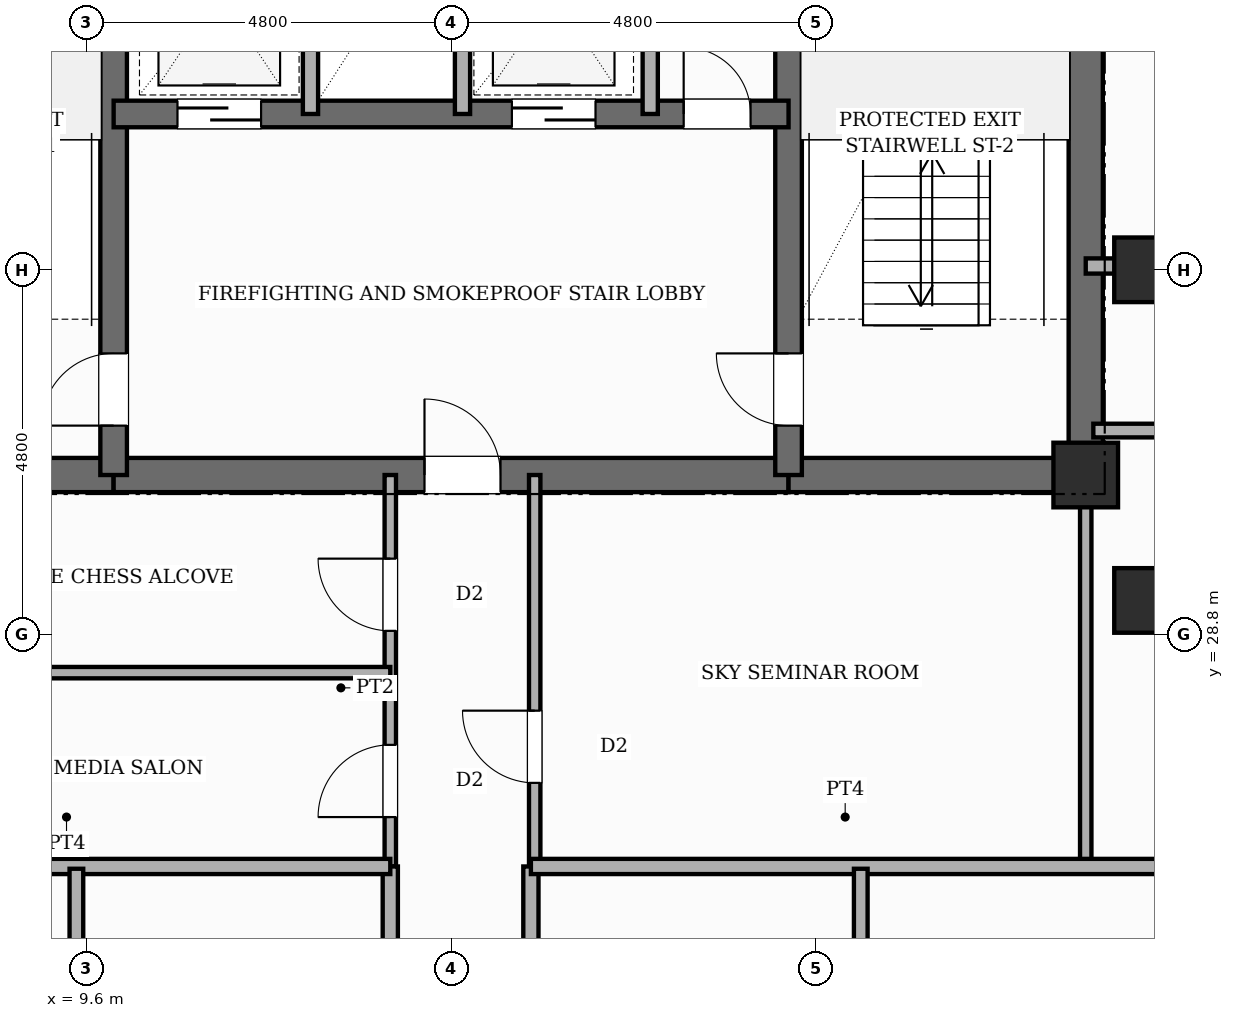
"""IFC4 building model, lengths in metres.
Left out: names, types, materials, properties, quantities, classifications, styles, units other than length and angle.
Written with IfcOpenShell. Run it as: python <this file> out.ifc"""

import sys

from ifc_helpers import new_model, si_unit, direction, frame, frame_2d, origin, origin_2d, place, context, subcontext, project, spatial, rectangle, extrude, element, fill, save


model = new_model("IFC4")
c1 = context("Model", 3, precision=1e-05, world=origin(), true_north=direction((0.0, 1.0)))
c2 = subcontext(c1, "Body", "Model", "MODEL_VIEW")
j1 = project(units=[si_unit("LENGTHUNIT", "METRE"), si_unit("PLANEANGLEUNIT", "RADIAN")], contexts=[c1])
p1 = place(None, origin())
s1 = spatial("IfcSite", under=j1, at=p1, CompositionType="ELEMENT")
p2 = place(p1, origin())
s2 = spatial("IfcBuilding", under=s1, at=p2, CompositionType="ELEMENT")
p3 = place(p2, frame((0.0, 0.0, 211.0)))
s3 = spatial("IfcBuildingStorey", under=s2, at=p3, CompositionType="ELEMENT", Elevation=211.0)
p4 = place(p3, frame((22.75, 30.675, 0.0), z_axis=(0.0, 0.0, 1.0), x_axis=(0.0, 1.0, 0.0)))
e1 = element("IfcWall", 1, at=p4, inside=s3, PredefinedType="SHEAR", context=c2, shape_type="SweptSolid", body=[
    extrude(rectangle(XDim=15.35, YDim=0.45, at=frame_2d((7.675, 0.0))), origin(), (0.0, 0.0, 1.0), 3.6),
])
p5 = place(p4, frame((10.675, 0.0, 0.0)))
e2 = element("IfcOpeningElement", 2, at=p5, cuts=e1, PredefinedType="OPENING", context=c2, shape_type="SweptSolid", body=[
    extrude(rectangle(XDim=1.0, YDim=2.15, at=frame_2d((0.5, 1.075))), frame((0.0, 0.235, 0.0), z_axis=(0.0, -1.0, 0.0), x_axis=(1.0, 0.0, 0.0)), (0.0, 0.0, 1.0), 0.47),
])
p6 = place(p3, frame((6.05, 30.9, 0.0), z_axis=(0.0, 0.0, 1.0), x_axis=(1.0, 0.0, 0.0)))
e3 = element("IfcWall", 3, at=p6, inside=s3, PredefinedType="SHEAR", context=c2, shape_type="SweptSolid", body=[
    extrude(rectangle(XDim=3.91, YDim=0.45, at=frame_2d((1.955, 0.0))), origin(), (0.0, 0.0, 1.0), 3.6),
])
p7 = place(p3, frame((9.96, 30.9, 0.0), z_axis=(0.0, 0.0, 1.0), x_axis=(1.0, 0.0, 0.0)))
e4 = element("IfcWall", 4, at=p7, inside=s3, PredefinedType="SHEAR", context=c2, shape_type="SweptSolid", body=[
    extrude(rectangle(XDim=8.88, YDim=0.45, at=frame_2d((4.44, 0.0))), origin(), (0.0, 0.0, 1.0), 3.6),
])
p8 = place(p7, frame((4.09, 0.0, 0.0)))
e5 = element("IfcOpeningElement", 5, at=p8, cuts=e4, PredefinedType="OPENING", context=c2, shape_type="SweptSolid", body=[
    extrude(rectangle(XDim=1.0, YDim=2.15, at=frame_2d((0.5, 1.075))), frame((0.0, 0.235, 0.0), z_axis=(0.0, -1.0, 0.0), x_axis=(1.0, 0.0, 0.0)), (0.0, 0.0, 1.0), 0.47),
])
p9 = place(p3, frame((18.84, 30.9, 0.0), z_axis=(0.0, 0.0, 1.0), x_axis=(1.0, 0.0, 0.0)))
e6 = element("IfcWall", 6, at=p9, inside=s3, PredefinedType="SHEAR", context=c2, shape_type="SweptSolid", body=[
    extrude(rectangle(XDim=3.91, YDim=0.45, at=frame_2d((1.955, 0.0))), origin(), (0.0, 0.0, 1.0), 3.6),
])
p10 = place(p3, frame((9.96, 30.9, 0.0), z_axis=(0.0, 0.0, 1.0), x_axis=(0.0, 1.0, 0.0)))
e7 = element("IfcWall", 7, at=p10, inside=s3, PredefinedType="SHEAR", context=c2, shape_type="SweptSolid", body=[
    extrude(rectangle(XDim=14.9, YDim=0.35, at=frame_2d((7.45, 0.0))), origin(), (0.0, 0.0, 1.0), 3.6),
])
p11 = place(p10, frame((0.65, 0.0, 0.0)))
e8 = element("IfcOpeningElement", 8, at=p11, cuts=e7, PredefinedType="OPENING", context=c2, shape_type="SweptSolid", body=[
    extrude(rectangle(XDim=0.95, YDim=2.1, at=frame_2d((0.475, 1.05))), frame((0.0, 0.185, 0.0), z_axis=(0.0, -1.0, 0.0), x_axis=(1.0, 0.0, 0.0)), (0.0, 0.0, 1.0), 0.37),
])
p12 = place(p10, frame((10.45, 0.0, 0.0)))
e9 = element("IfcOpeningElement", 9, at=p12, cuts=e7, PredefinedType="OPENING", context=c2, shape_type="SweptSolid", body=[
    extrude(rectangle(XDim=1.0, YDim=2.15, at=frame_2d((0.5, 1.075))), frame((0.0, 0.185, 0.0), z_axis=(0.0, -1.0, 0.0), x_axis=(1.0, 0.0, 0.0)), (0.0, 0.0, 1.0), 0.37),
])
p13 = place(p3, frame((18.84, 30.9, 0.0), z_axis=(0.0, 0.0, 1.0), x_axis=(0.0, 1.0, 0.0)))
e10 = element("IfcWall", 10, at=p13, inside=s3, PredefinedType="SHEAR", context=c2, shape_type="SweptSolid", body=[
    extrude(rectangle(XDim=14.9, YDim=0.35, at=frame_2d((7.45, 0.0))), origin(), (0.0, 0.0, 1.0), 3.6),
])
p14 = place(p13, frame((0.65, 0.0, 0.0)))
e11 = element("IfcOpeningElement", 11, at=p14, cuts=e10, PredefinedType="OPENING", context=c2, shape_type="SweptSolid", body=[
    extrude(rectangle(XDim=0.95, YDim=2.1, at=frame_2d((0.475, 1.05))), frame((0.0, 0.185, 0.0), z_axis=(0.0, -1.0, 0.0), x_axis=(1.0, 0.0, 0.0)), (0.0, 0.0, 1.0), 0.37),
])
p15 = place(p13, frame((10.45, 0.0, 0.0)))
e12 = element("IfcOpeningElement", 12, at=p15, cuts=e10, PredefinedType="OPENING", context=c2, shape_type="SweptSolid", body=[
    extrude(rectangle(XDim=1.0, YDim=2.15, at=frame_2d((0.5, 1.075))), frame((0.0, 0.185, 0.0), z_axis=(0.0, -1.0, 0.0), x_axis=(1.0, 0.0, 0.0)), (0.0, 0.0, 1.0), 0.37),
])
p16 = place(p3, frame((9.96, 35.65, 0.0), z_axis=(0.0, 0.0, 1.0), x_axis=(1.0, 0.0, 0.0)))
e13 = element("IfcWall", 13, at=p16, inside=s3, PredefinedType="SHEAR", context=c2, shape_type="SweptSolid", body=[
    extrude(rectangle(XDim=8.88, YDim=0.35, at=frame_2d((4.44, 0.0))), origin(), (0.0, 0.0, 1.0), 3.6),
])
p17 = place(p16, frame((0.84, 0.0, 0.0)))
e14 = element("IfcOpeningElement", 14, at=p17, cuts=e13, PredefinedType="OPENING", context=c2, shape_type="SweptSolid", body=[
    extrude(rectangle(XDim=1.1, YDim=2.15, at=frame_2d((0.55, 1.075))), frame((0.0, 0.185, 0.0), z_axis=(0.0, -1.0, 0.0), x_axis=(1.0, 0.0, 0.0)), (0.0, 0.0, 1.0), 0.37),
])
p18 = place(p16, frame((5.24, 0.0, 0.0)))
e15 = element("IfcOpeningElement", 15, at=p18, cuts=e13, PredefinedType="OPENING", context=c2, shape_type="SweptSolid", body=[
    extrude(rectangle(XDim=1.1, YDim=2.15, at=frame_2d((0.55, 1.075))), frame((0.0, 0.185, 0.0), z_axis=(0.0, -1.0, 0.0), x_axis=(1.0, 0.0, 0.0)), (0.0, 0.0, 1.0), 0.37),
])
p19 = place(p16, frame((7.5, 0.0, 0.0)))
e16 = element("IfcOpeningElement", 16, at=p19, cuts=e13, PredefinedType="OPENING", context=c2, shape_type="SweptSolid", body=[
    extrude(rectangle(XDim=0.88, YDim=2.1, at=frame_2d((0.44, 1.05))), frame((0.0, 0.185, 0.0), z_axis=(0.0, -1.0, 0.0), x_axis=(1.0, 0.0, 0.0)), (0.0, 0.0, 1.0), 0.37),
])
for number, where, z_axis, x_axis in (
    (17, (22.75, 30.9, 0.0), (0.0, 0.0, 1.0), (1.0, 0.0, 0.0)),
    (18, (23.55, 29.25, 0.0), (0.0, 0.0, 1.0), (1.0, 0.0, 0.0)),
    (19, (23.55, 33.6, 0.0), (0.0, 0.0, 1.0), (1.0, 0.0, 0.0)),
):
    element("IfcColumn", number, at=place(p3, frame(where, z_axis=z_axis, x_axis=x_axis)), inside=s3, PredefinedType="COLUMN", context=c2, shape_type="SweptSolid", body=[
        extrude(rectangle(XDim=0.85, YDim=0.85, at=origin_2d()), origin(), (0.0, 0.0, 1.0), 3.6),
    ])
for number, where, z_axis, x_axis in (
    (20, (12.55, 35.65, 0.0), (0.0, 0.0, 1.0), (0.0, 1.0, 0.0)),
    (21, (14.55, 35.65, 0.0), (0.0, 0.0, 1.0), (0.0, 1.0, 0.0)),
):
    element("IfcWall", number, at=place(p3, frame(where, z_axis=z_axis, x_axis=x_axis)), inside=s3, PredefinedType="POLYGONAL", context=c2, shape_type="SweptSolid", body=[
        extrude(rectangle(XDim=3.07, YDim=0.2, at=frame_2d((1.535, 0.0))), origin(), (0.0, 0.0, 1.0), 3.38),
    ])
p20 = place(p3, frame((17.02, 35.65, 0.0), z_axis=(0.0, 0.0, 1.0), x_axis=(0.0, 1.0, 0.0)))
e22 = element("IfcWall", 22, at=p20, inside=s3, PredefinedType="POLYGONAL", context=c2, shape_type="SweptSolid", body=[
    extrude(rectangle(XDim=5.15, YDim=0.2, at=frame_2d((2.575, 0.0))), origin(), (0.0, 0.0, 1.0), 3.38),
])
p21 = place(p3, frame((13.6, 25.75, 0.0), z_axis=(0.0, 0.0, 1.0), x_axis=(0.0, 1.0, 0.0)))
e23 = element("IfcWall", 23, at=p21, inside=s3, PredefinedType="PARTITIONING", context=c2, shape_type="SweptSolid", body=[
    extrude(rectangle(XDim=5.15, YDim=0.15, at=frame_2d((2.575, 0.0))), origin(), (0.0, 0.0, 1.0), 3.38),
])
p22 = place(p21, frame((0.65, 0.0, 0.0)))
e24 = element("IfcOpeningElement", 24, at=p22, cuts=e23, PredefinedType="OPENING", context=c2, shape_type="SweptSolid", body=[
    extrude(rectangle(XDim=0.95, YDim=2.15, at=frame_2d((0.475, 1.075))), frame((0.0, 0.085, 0.0), z_axis=(0.0, -1.0, 0.0), x_axis=(1.0, 0.0, 0.0)), (0.0, 0.0, 1.0), 0.17),
])
p23 = place(p21, frame((3.1, 0.0, 0.0)))
e25 = element("IfcOpeningElement", 25, at=p23, cuts=e23, PredefinedType="OPENING", context=c2, shape_type="SweptSolid", body=[
    extrude(rectangle(XDim=0.95, YDim=2.15, at=frame_2d((0.475, 1.075))), frame((0.0, 0.085, 0.0), z_axis=(0.0, -1.0, 0.0), x_axis=(1.0, 0.0, 0.0)), (0.0, 0.0, 1.0), 0.17),
])
p24 = place(p3, frame((15.5, 25.75, 0.0), z_axis=(0.0, 0.0, 1.0), x_axis=(0.0, 1.0, 0.0)))
e26 = element("IfcWall", 26, at=p24, inside=s3, PredefinedType="PARTITIONING", context=c2, shape_type="SweptSolid", body=[
    extrude(rectangle(XDim=5.15, YDim=0.15, at=frame_2d((2.575, 0.0))), origin(), (0.0, 0.0, 1.0), 3.38),
])
p25 = place(p24, frame((1.1, 0.0, 0.0)))
e27 = element("IfcOpeningElement", 27, at=p25, cuts=e26, PredefinedType="OPENING", context=c2, shape_type="SweptSolid", body=[
    extrude(rectangle(XDim=0.95, YDim=2.15, at=frame_2d((0.475, 1.075))), frame((0.0, 0.085, 0.0), z_axis=(0.0, -1.0, 0.0), x_axis=(1.0, 0.0, 0.0)), (0.0, 0.0, 1.0), 0.17),
])
p26 = place(p3, frame((22.75, 25.75, 0.0), z_axis=(0.0, 0.0, 1.0), x_axis=(0.0, 1.0, 0.0)))
e28 = element("IfcWall", 28, at=p26, inside=s3, PredefinedType="PARTITIONING", context=c2, shape_type="SweptSolid", body=[
    extrude(rectangle(XDim=5.15, YDim=0.15, at=frame_2d((2.575, 0.0))), origin(), (0.0, 0.0, 1.0), 3.38),
])
p27 = place(p3, frame((6.05, 28.3, 0.0), z_axis=(0.0, 0.0, 1.0), x_axis=(1.0, 0.0, 0.0)))
e29 = element("IfcWall", 29, at=p27, inside=s3, PredefinedType="PARTITIONING", context=c2, shape_type="SweptSolid", body=[
    extrude(rectangle(XDim=7.55, YDim=0.15, at=frame_2d((3.775, 0.0))), origin(), (0.0, 0.0, 1.0), 3.38),
])
p28 = place(p3, frame((13.6, 9.88, 0.0), z_axis=(0.0, 0.0, 1.0), x_axis=(0.0, 1.0, 0.0)))
e30 = element("IfcWall", 30, at=p28, inside=s3, PredefinedType="PARTITIONING", context=c2, shape_type="SweptSolid", body=[
    extrude(rectangle(XDim=15.87, YDim=0.2, at=frame_2d((7.935, 0.0))), origin(), (0.0, 0.0, 1.0), 3.38),
])
p29 = place(p28, frame((0.949, 0.0, 0.0)))
e31 = element("IfcOpeningElement", 31, at=p29, cuts=e30, PredefinedType="OPENING", context=c2, shape_type="SweptSolid", body=[
    extrude(rectangle(XDim=0.98, YDim=2.18, at=frame_2d((0.49, 1.09))), frame((0.0, 0.11, 0.0), z_axis=(0.0, -1.0, 0.0), x_axis=(1.0, 0.0, 0.0)), (0.0, 0.0, 1.0), 0.22),
])
p30 = place(p28, frame((6.12, 0.0, 0.0)))
e32 = element("IfcOpeningElement", 32, at=p30, cuts=e30, PredefinedType="OPENING", context=c2, shape_type="SweptSolid", body=[
    extrude(rectangle(XDim=0.98, YDim=2.18, at=frame_2d((0.49, 1.09))), frame((0.0, 0.11, 0.0), z_axis=(0.0, -1.0, 0.0), x_axis=(1.0, 0.0, 0.0)), (0.0, 0.0, 1.0), 0.22),
])
p31 = place(p28, frame((11.52, 0.0, 0.0)))
e33 = element("IfcOpeningElement", 33, at=p31, cuts=e30, PredefinedType="OPENING", context=c2, shape_type="SweptSolid", body=[
    extrude(rectangle(XDim=0.98, YDim=2.18, at=frame_2d((0.49, 1.09))), frame((0.0, 0.11, 0.0), z_axis=(0.0, -1.0, 0.0), x_axis=(1.0, 0.0, 0.0)), (0.0, 0.0, 1.0), 0.22),
])
p32 = place(p3, frame((15.45, 9.88, 0.0), z_axis=(0.0, 0.0, 1.0), x_axis=(0.0, 1.0, 0.0)))
e34 = element("IfcWall", 34, at=p32, inside=s3, PredefinedType="PARTITIONING", context=c2, shape_type="SweptSolid", body=[
    extrude(rectangle(XDim=15.87, YDim=0.2, at=frame_2d((7.935, 0.0))), origin(), (0.0, 0.0, 1.0), 3.38),
])
p33 = place(p32, frame((0.949, 0.0, 0.0)))
e35 = element("IfcOpeningElement", 35, at=p33, cuts=e34, PredefinedType="OPENING", context=c2, shape_type="SweptSolid", body=[
    extrude(rectangle(XDim=0.98, YDim=2.18, at=frame_2d((0.49, 1.09))), frame((0.0, 0.11, 0.0), z_axis=(0.0, -1.0, 0.0), x_axis=(1.0, 0.0, 0.0)), (0.0, 0.0, 1.0), 0.22),
])
p34 = place(p32, frame((6.12, 0.0, 0.0)))
e36 = element("IfcOpeningElement", 36, at=p34, cuts=e34, PredefinedType="OPENING", context=c2, shape_type="SweptSolid", body=[
    extrude(rectangle(XDim=0.98, YDim=2.18, at=frame_2d((0.49, 1.09))), frame((0.0, 0.11, 0.0), z_axis=(0.0, -1.0, 0.0), x_axis=(1.0, 0.0, 0.0)), (0.0, 0.0, 1.0), 0.22),
])
p35 = place(p32, frame((11.52, 0.0, 0.0)))
e37 = element("IfcOpeningElement", 37, at=p35, cuts=e34, PredefinedType="OPENING", context=c2, shape_type="SweptSolid", body=[
    extrude(rectangle(XDim=0.98, YDim=2.18, at=frame_2d((0.49, 1.09))), frame((0.0, 0.11, 0.0), z_axis=(0.0, -1.0, 0.0), x_axis=(1.0, 0.0, 0.0)), (0.0, 0.0, 1.0), 0.22),
])
p36 = place(p3, frame((5.08, 25.75, 0.0), z_axis=(0.0, 0.0, 1.0), x_axis=(1.0, 0.0, 0.0)))
e38 = element("IfcWall", 38, at=p36, inside=s3, PredefinedType="PARTITIONING", context=c2, shape_type="SweptSolid", body=[
    extrude(rectangle(XDim=8.52, YDim=0.2, at=frame_2d((4.26, 0.0))), origin(), (0.0, 0.0, 1.0), 3.38),
])
p37 = place(p3, frame((15.45, 25.75, 0.0), z_axis=(0.0, 0.0, 1.0), x_axis=(1.0, 0.0, 0.0)))
e39 = element("IfcWall", 39, at=p37, inside=s3, PredefinedType="PARTITIONING", context=c2, shape_type="SweptSolid", body=[
    extrude(rectangle(XDim=8.27, YDim=0.2, at=frame_2d((4.135, 0.0))), origin(), (0.0, 0.0, 1.0), 3.38),
])
for number, where, z_axis, x_axis in (
    (40, (9.47, 22.94, 0.0), (0.0, 0.0, 1.0), (0.0, 1.0, 0.0)),
    (41, (19.79, 22.94, 0.0), (0.0, 0.0, 1.0), (0.0, 1.0, 0.0)),
):
    element("IfcWall", number, at=place(p3, frame(where, z_axis=z_axis, x_axis=x_axis)), inside=s3, PredefinedType="PLUMBINGWALL", context=c2, shape_type="SweptSolid", body=[
        extrude(rectangle(XDim=2.78, YDim=0.18, at=frame_2d((1.39, 0.0))), origin(), (0.0, 0.0, 1.0), 3.38),
    ])
p38 = place(p3, frame((22.75, 33.65, 0.0), z_axis=(0.0, 0.0, 1.0), x_axis=(1.0, 0.0, 0.0)))
e42 = element("IfcWall", 42, at=p38, inside=s3, PredefinedType="PARTITIONING", context=c2, shape_type="SweptSolid", body=[
    extrude(rectangle(XDim=29.77, YDim=0.2, at=frame_2d((14.885, 0.0))), origin(), (0.0, 0.0, 1.0), 3.38),
])
p39 = place(p38, frame((5.995, 0.0, 0.0)))
e43 = element("IfcOpeningElement", 43, at=p39, cuts=e42, PredefinedType="OPENING", context=c2, shape_type="SweptSolid", body=[
    extrude(rectangle(XDim=0.98, YDim=2.18, at=frame_2d((0.49, 1.09))), frame((0.0, 0.11, 0.0), z_axis=(0.0, -1.0, 0.0), x_axis=(1.0, 0.0, 0.0)), (0.0, 0.0, 1.0), 0.22),
])
p40 = place(p38, frame((10.896, 0.0, 0.0)))
e44 = element("IfcOpeningElement", 44, at=p40, cuts=e42, PredefinedType="OPENING", context=c2, shape_type="SweptSolid", body=[
    extrude(rectangle(XDim=0.98, YDim=2.18, at=frame_2d((0.49, 1.09))), frame((0.0, 0.11, 0.0), z_axis=(0.0, -1.0, 0.0), x_axis=(1.0, 0.0, 0.0)), (0.0, 0.0, 1.0), 0.22),
])
p41 = place(p38, frame((20.73, 0.0, 0.0)))
e45 = element("IfcOpeningElement", 45, at=p41, cuts=e42, PredefinedType="OPENING", context=c2, shape_type="SweptSolid", body=[
    extrude(rectangle(XDim=0.98, YDim=2.18, at=frame_2d((0.49, 1.09))), frame((0.0, 0.11, 0.0), z_axis=(0.0, -1.0, 0.0), x_axis=(1.0, 0.0, 0.0)), (0.0, 0.0, 1.0), 0.22),
])
p42 = place(p3, frame((22.85, 31.485, 0.0), z_axis=(0.0, 0.0, 1.0), x_axis=(1.0, 0.0, 0.0)))
e46 = element("IfcWall", 46, at=p42, inside=s3, PredefinedType="PLUMBINGWALL", context=c2, shape_type="SweptSolid", body=[
    extrude(rectangle(XDim=3.9, YDim=0.18, at=frame_2d((1.95, 0.0))), origin(), (0.0, 0.0, 1.0), 3.38),
])
p43 = place(p11, origin())
e47 = element("IfcDoor", 47, at=p43, inside=s3, OperationType="SINGLE_SWING_LEFT", PredefinedType="DOOR", context=c2, shape_type="SweptSolid", body=[
    extrude(rectangle(XDim=0.95, YDim=2.1, at=frame_2d((0.475, 1.05))), frame((0.0, 0.025, 0.0), z_axis=(0.0, -1.0, 0.0), x_axis=(1.0, 0.0, 0.0)), (0.0, 0.0, 1.0), 0.05),
])
fill(e8, e47)
p44 = place(p14, origin())
e48 = element("IfcDoor", 48, at=p44, inside=s3, OperationType="SINGLE_SWING_RIGHT", PredefinedType="DOOR", context=c2, shape_type="SweptSolid", body=[
    extrude(rectangle(XDim=0.95, YDim=2.1, at=frame_2d((0.475, 1.05))), frame((0.0, 0.025, 0.0), z_axis=(0.0, -1.0, 0.0), x_axis=(1.0, 0.0, 0.0)), (0.0, 0.0, 1.0), 0.05),
])
fill(e11, e48)
p45 = place(p8, origin())
e49 = element("IfcDoor", 49, at=p45, inside=s3, OperationType="SINGLE_SWING_LEFT", PredefinedType="DOOR", context=c2, shape_type="SweptSolid", body=[
    extrude(rectangle(XDim=1.0, YDim=2.15, at=frame_2d((0.5, 1.075))), frame((0.0, 0.025, 0.0), z_axis=(0.0, -1.0, 0.0), x_axis=(1.0, 0.0, 0.0)), (0.0, 0.0, 1.0), 0.05),
])
fill(e5, e49)
p46 = place(p17, origin())
e50 = element("IfcDoor", 50, at=p46, inside=s3, OperationType="SLIDING_TO_LEFT", PredefinedType="DOOR", context=c2, shape_type="SweptSolid", body=[
    extrude(rectangle(XDim=1.1, YDim=2.15, at=frame_2d((0.55, 1.075))), frame((0.0, 0.025, 0.0), z_axis=(0.0, -1.0, 0.0), x_axis=(1.0, 0.0, 0.0)), (0.0, 0.0, 1.0), 0.05),
])
fill(e14, e50)
p47 = place(p18, origin())
e51 = element("IfcDoor", 51, at=p47, inside=s3, OperationType="SLIDING_TO_RIGHT", PredefinedType="DOOR", context=c2, shape_type="SweptSolid", body=[
    extrude(rectangle(XDim=1.1, YDim=2.15, at=frame_2d((0.55, 1.075))), frame((0.0, 0.025, 0.0), z_axis=(0.0, -1.0, 0.0), x_axis=(1.0, 0.0, 0.0)), (0.0, 0.0, 1.0), 0.05),
])
fill(e15, e51)
p48 = place(p19, origin())
e52 = element("IfcDoor", 52, at=p48, inside=s3, OperationType="SINGLE_SWING_LEFT", PredefinedType="DOOR", context=c2, shape_type="SweptSolid", body=[
    extrude(rectangle(XDim=0.88, YDim=2.1, at=frame_2d((0.44, 1.05))), frame((0.0, 0.025, 0.0), z_axis=(0.0, -1.0, 0.0), x_axis=(1.0, 0.0, 0.0)), (0.0, 0.0, 1.0), 0.05),
])
fill(e16, e52)
p49 = place(p22, origin())
e53 = element("IfcDoor", 53, at=p49, inside=s3, OperationType="SINGLE_SWING_LEFT", PredefinedType="DOOR", context=c2, shape_type="SweptSolid", body=[
    extrude(rectangle(XDim=0.95, YDim=2.15, at=frame_2d((0.475, 1.075))), frame((0.0, 0.025, 0.0), z_axis=(0.0, -1.0, 0.0), x_axis=(1.0, 0.0, 0.0)), (0.0, 0.0, 1.0), 0.05),
])
fill(e24, e53)
p50 = place(p23, origin())
e54 = element("IfcDoor", 54, at=p50, inside=s3, OperationType="SINGLE_SWING_RIGHT", PredefinedType="DOOR", context=c2, shape_type="SweptSolid", body=[
    extrude(rectangle(XDim=0.95, YDim=2.15, at=frame_2d((0.475, 1.075))), frame((0.0, 0.025, 0.0), z_axis=(0.0, -1.0, 0.0), x_axis=(1.0, 0.0, 0.0)), (0.0, 0.0, 1.0), 0.05),
])
fill(e25, e54)
p51 = place(p25, origin())
e55 = element("IfcDoor", 55, at=p51, inside=s3, OperationType="SINGLE_SWING_RIGHT", PredefinedType="DOOR", context=c2, shape_type="SweptSolid", body=[
    extrude(rectangle(XDim=0.95, YDim=2.15, at=frame_2d((0.475, 1.075))), frame((0.0, 0.025, 0.0), z_axis=(0.0, -1.0, 0.0), x_axis=(1.0, 0.0, 0.0)), (0.0, 0.0, 1.0), 0.05),
])
fill(e27, e55)
save(model, sys.argv[1])
